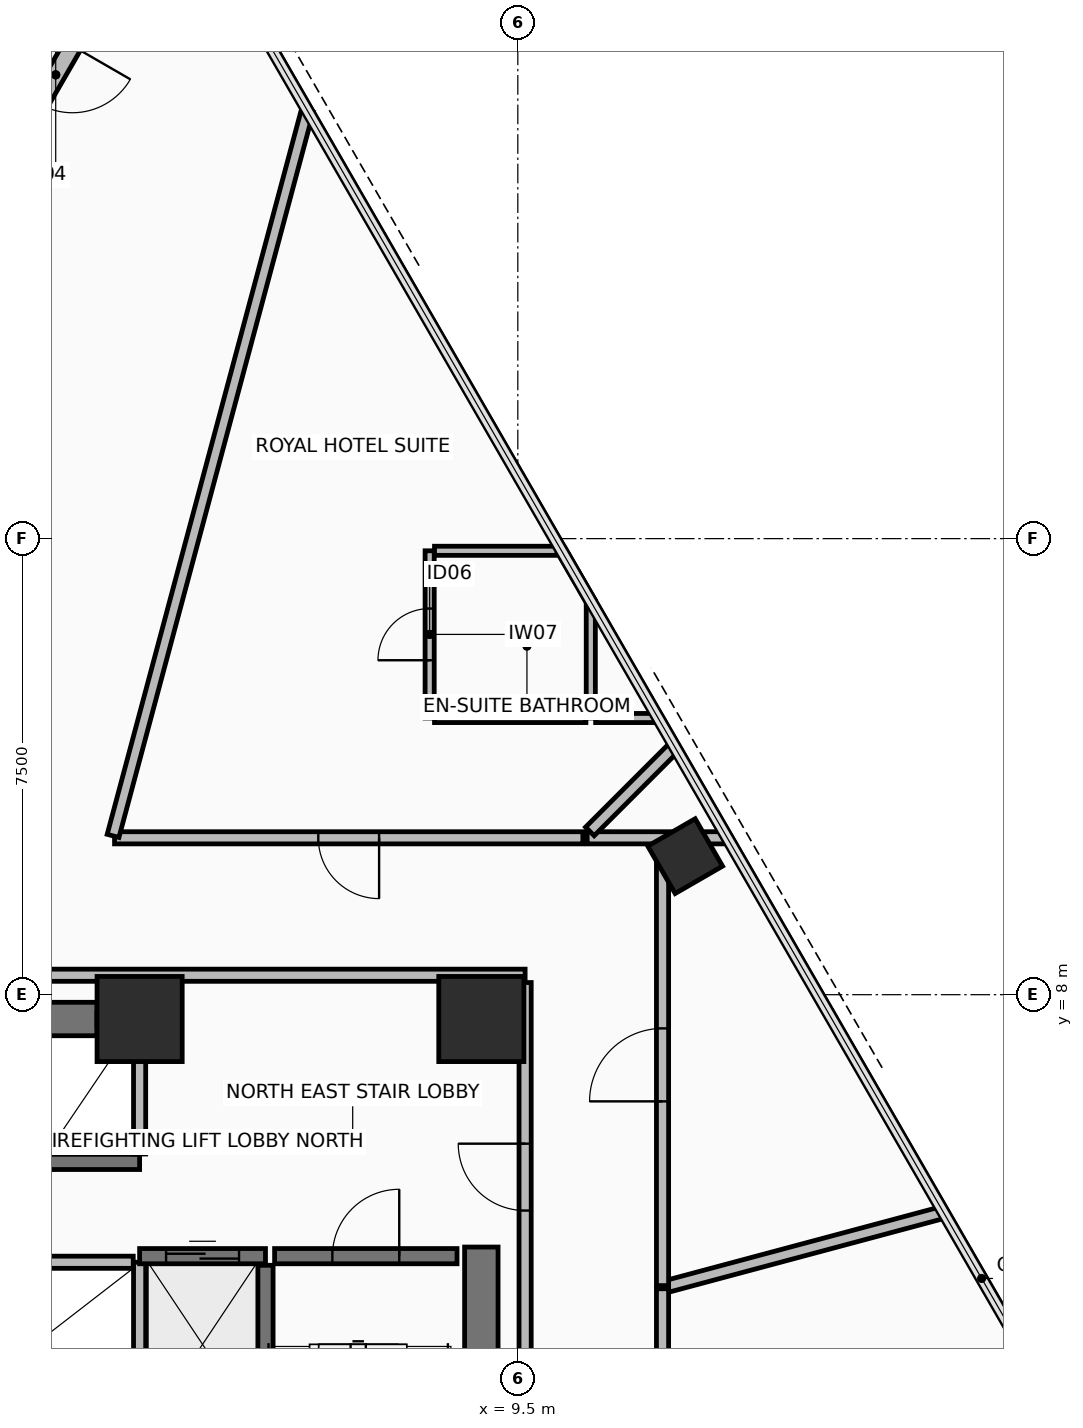
"""IFC4 building model, lengths in metres.
Left out: names, types, materials, properties, quantities, classifications, styles, units other than length and angle.
Written with IfcOpenShell. Run it as: python <this file> out.ifc"""

import sys

from ifc_helpers import new_model, si_unit, direction, frame, frame_2d, origin, origin_2d, place, context, subcontext, project, spatial, rectangle, hollow_rectangle, extrude, element, fill, save


model = new_model("IFC4")
c1 = context("Model", 3, precision=1e-05, world=origin(), true_north=direction((0.0, 1.0)))
c2 = subcontext(c1, "Body", "Model", "MODEL_VIEW")
j1 = project(units=[si_unit("LENGTHUNIT", "METRE"), si_unit("PLANEANGLEUNIT", "RADIAN")], contexts=[c1])
p1 = place(None, origin())
s1 = spatial("IfcSite", under=j1, at=p1, CompositionType="ELEMENT")
p2 = place(p1, origin())
s2 = spatial("IfcBuilding", under=s1, at=p2, CompositionType="ELEMENT")
p3 = place(p2, frame((0.0, 0.0, 52.25)))
s3 = spatial("IfcBuildingStorey", under=s2, at=p3, CompositionType="ELEMENT", Elevation=52.25)
for number, where, z_axis, x_axis in (
    (1, (8.9, 7.6, 0.0), (0.0, 0.0, 1.0), (1.0, 0.0, 0.0)),
    (2, (3.28, 7.6, 0.0), (0.0, 0.0, 1.0), (1.0, 0.0, 0.0)),
):
    element("IfcColumn", number, at=place(p3, frame(where, z_axis=z_axis, x_axis=x_axis)), inside=s3, PredefinedType="COLUMN", context=c2, shape_type="SweptSolid", body=[
        extrude(rectangle(XDim=1.4, YDim=1.4, at=origin_2d()), origin(), (0.0, 0.0, 1.0), 4.75),
    ])
p4 = place(p3, frame((12.252, 10.279, 0.0), z_axis=(0.0, 0.0, 1.0), x_axis=(-0.500001511499, 0.866024531118, 0.0)))
e3 = element("IfcColumn", 3, at=p4, inside=s3, PredefinedType="COLUMN", context=c2, shape_type="SweptSolid", body=[
    extrude(hollow_rectangle(XDim=0.9, YDim=0.9, WallThickness=0.05, at=origin_2d()), origin(), (0.0, 0.0, 1.0), 4.75),
])
p5 = place(p3, frame((3.8, 26.418, 0.0), z_axis=(0.0, 0.0, 1.0), x_axis=(-0.500005158081, -0.866022425744, 0.0)))
e4 = element("IfcWall", 4, at=p5, inside=s3, PredefinedType="STANDARD", context=c2, shape_type="SweptSolid", body=[
    extrude(rectangle(XDim=7.6, YDim=0.3, at=frame_2d((3.8, 0.0))), origin(), (0.0, 0.0, 1.0), 2.255),
])
p6 = place(p5, frame((3.25, 0.0, 0.0)))
e5 = element("IfcOpeningElement", 5, at=p6, cuts=e4, PredefinedType="OPENING", context=c2, shape_type="SweptSolid", body=[
    extrude(rectangle(XDim=1.1, YDim=2.2, at=frame_2d((0.55, 1.1))), frame((0.0, 0.16, 0.0), z_axis=(0.0, -1.0, 0.0), x_axis=(1.0, 0.0, 0.0)), (0.0, 0.0, 1.0), 0.32),
])
p7 = place(p3, frame((-2.8, 7.6, 0.0), z_axis=(0.0, 0.0, 1.0), x_axis=(1.0, 0.0, 0.0)))
e6 = element("IfcWall", 6, at=p7, inside=s3, PredefinedType="SHEAR", context=c2, shape_type="SweptSolid", body=[
    extrude(rectangle(XDim=5.38, YDim=0.55, at=frame_2d((2.69, 0.0))), origin(), (0.0, 0.0, 1.0), 4.56),
])
p8 = place(p3, frame((8.9, -6.85, 0.0), z_axis=(0.0, 0.0, 1.0), x_axis=(0.0, 1.0, 0.0)))
e7 = element("IfcWall", 7, at=p8, inside=s3, PredefinedType="SHEAR", context=c2, shape_type="SweptSolid", body=[
    extrude(rectangle(XDim=10.7, YDim=0.55, at=frame_2d((5.35, 0.0))), origin(), (0.0, 0.0, 1.0), 4.56),
])
p9 = place(p3, frame((9.62, 8.32, 0.0), z_axis=(0.0, 0.0, 1.0), x_axis=(-1.0, 0.0, 0.0)))
e8 = element("IfcWall", 8, at=p9, inside=s3, PredefinedType="PARTITIONING", context=c2, shape_type="SweptSolid", body=[
    extrude(rectangle(XDim=19.24, YDim=0.2, at=frame_2d((9.62, 0.0))), origin(), (0.0, 0.0, 1.0), 2.355),
])
p10 = place(p9, frame((16.245, 0.0, 0.0)))
e9 = element("IfcOpeningElement", 9, at=p10, cuts=e8, PredefinedType="OPENING", context=c2, shape_type="SweptSolid", body=[
    extrude(rectangle(XDim=0.9, YDim=2.1, at=frame_2d((0.45, 1.05))), frame((0.0, 0.11, 0.0), z_axis=(0.0, -1.0, 0.0), x_axis=(1.0, 0.0, 0.0)), (0.0, 0.0, 1.0), 0.22),
])
p11 = place(p9, frame((14.295, 0.0, 0.0)))
e10 = element("IfcOpeningElement", 10, at=p11, cuts=e8, PredefinedType="OPENING", context=c2, shape_type="SweptSolid", body=[
    extrude(rectangle(XDim=0.9, YDim=2.1, at=frame_2d((0.45, 1.05))), frame((0.0, 0.11, 0.0), z_axis=(0.0, -1.0, 0.0), x_axis=(1.0, 0.0, 0.0)), (0.0, 0.0, 1.0), 0.22),
])
p12 = place(p3, frame((9.62, -8.2, 0.0), z_axis=(0.0, 0.0, 1.0), x_axis=(0.0, 1.0, 0.0)))
e11 = element("IfcWall", 11, at=p12, inside=s3, PredefinedType="PARTITIONING", context=c2, shape_type="SweptSolid", body=[
    extrude(rectangle(XDim=16.4, YDim=0.2, at=frame_2d((8.2, 0.0))), origin(), (0.0, 0.0, 1.0), 2.355),
])
p13 = place(p12, frame((12.65, 0.0, 0.0)))
e12 = element("IfcOpeningElement", 12, at=p13, cuts=e11, PredefinedType="OPENING", context=c2, shape_type="SweptSolid", body=[
    extrude(rectangle(XDim=1.1, YDim=2.15, at=frame_2d((0.55, 1.075))), frame((0.0, 0.11, 0.0), z_axis=(0.0, -1.0, 0.0), x_axis=(1.0, 0.0, 0.0)), (0.0, 0.0, 1.0), 0.22),
])
p14 = place(p3, frame((5.35, -3.75, 0.0), z_axis=(0.0, 0.0, 1.0), x_axis=(0.0, 1.0, 0.0)))
e13 = element("IfcWall", 13, at=p14, inside=s3, PredefinedType="SHEAR", context=c2, shape_type="SweptSolid", body=[
    extrude(rectangle(XDim=7.3, YDim=0.25, at=frame_2d((3.65, 0.0))), origin(), (0.0, 0.0, 1.0), 4.56),
])
p15 = place(p3, frame((5.5, 3.7, 0.0), z_axis=(0.0, 0.0, 1.0), x_axis=(1.0, 0.0, 0.0)))
e14 = element("IfcWall", 14, at=p15, inside=s3, PredefinedType="SHEAR", context=c2, shape_type="SweptSolid", body=[
    extrude(rectangle(XDim=3.0, YDim=0.25, at=frame_2d((1.5, 0.0))), origin(), (0.0, 0.0, 1.0), 4.56),
])
p16 = place(p15, frame((0.95, 0.0, 0.0)))
e15 = element("IfcOpeningElement", 15, at=p16, cuts=e14, PredefinedType="OPENING", context=c2, shape_type="SweptSolid", body=[
    extrude(rectangle(XDim=1.1, YDim=2.15, at=frame_2d((0.55, 1.075))), frame((0.0, 0.135, 0.0), z_axis=(0.0, -1.0, 0.0), x_axis=(1.0, 0.0, 0.0)), (0.0, 0.0, 1.0), 0.27),
])
p17 = place(p3, frame((1.637, 5.25, 0.0), z_axis=(0.0, 0.0, 1.0), x_axis=(1.0, 0.0, 0.0)))
e16 = element("IfcWall", 16, at=p17, inside=s3, PredefinedType="SHEAR", context=c2, shape_type="SweptSolid", body=[
    extrude(rectangle(XDim=1.643, YDim=0.25, at=frame_2d((0.821, 0.0))), origin(), (0.0, 0.0, 1.0), 4.56),
])
p18 = place(p3, frame((2.58, 7.6, 0.0), z_axis=(0.0, 0.0, 1.0), x_axis=(1.0, 0.0, 0.0)))
e17 = element("IfcWall", 17, at=p18, inside=s3, PredefinedType="PARTITIONING", context=c2, shape_type="SweptSolid", body=[
    extrude(rectangle(XDim=0.7, YDim=0.2, at=frame_2d((0.35, 0.0))), origin(), (0.0, 0.0, 1.0), 2.355),
])
p19 = place(p3, frame((3.28, 5.38, 0.0), z_axis=(0.0, 0.0, 1.0), x_axis=(0.0, 1.0, 0.0)))
e18 = element("IfcWall", 18, at=p19, inside=s3, PredefinedType="PARTITIONING", context=c2, shape_type="SweptSolid", body=[
    extrude(rectangle(XDim=2.115, YDim=0.2, at=frame_2d((1.058, 0.0))), origin(), (0.0, 0.0, 1.0), 2.355),
])
p20 = place(p3, frame((3.28, 1.8, 0.0), z_axis=(0.0, 0.0, 1.0), x_axis=(0.0, 1.0, 0.0)))
e19 = element("IfcWall", 19, at=p20, inside=s3, PredefinedType="PARTITIONING", context=c2, shape_type="SweptSolid", body=[
    extrude(rectangle(XDim=1.8, YDim=0.2, at=frame_2d((0.9, 0.0))), origin(), (0.0, 0.0, 1.0), 4.56),
])
p21 = place(p3, frame((1.13, 3.6, 0.0), z_axis=(0.0, 0.0, 1.0), x_axis=(1.0, 0.0, 0.0)))
e20 = element("IfcWall", 20, at=p21, inside=s3, PredefinedType="PARTITIONING", context=c2, shape_type="SweptSolid", body=[
    extrude(rectangle(XDim=2.045, YDim=0.2, at=frame_2d((1.022, 0.0))), origin(), (0.0, 0.0, 1.0), 3.755),
])
p22 = place(p3, frame((3.28, 3.7, 0.0), z_axis=(0.0, 0.0, 1.0), x_axis=(1.0, 0.0, 0.0)))
e21 = element("IfcWall", 21, at=p22, inside=s3, PredefinedType="SHEAR", context=c2, shape_type="SweptSolid", body=[
    extrude(rectangle(XDim=2.07, YDim=0.25, at=frame_2d((1.035, 0.0))), origin(), (0.0, 0.0, 1.0), 4.56),
])
p23 = place(p22, frame((0.435, 0.0, 0.0)))
e22 = element("IfcOpeningElement", 22, at=p23, cuts=e21, PredefinedType="OPENING", context=c2, shape_type="SweptSolid", body=[
    extrude(rectangle(XDim=1.2, YDim=2.2, at=frame_2d((0.6, 1.1))), frame((0.0, 0.135, 0.0), z_axis=(0.0, -1.0, 0.0), x_axis=(1.0, 0.0, 0.0)), (0.0, 0.0, 1.0), 0.27),
])
p24 = place(p3, frame((8.05, 12.55, 0.0), z_axis=(0.0, 0.0, 1.0), x_axis=(0.0, 1.0, 0.0)))
e23 = element("IfcWall", 23, at=p24, inside=s3, PredefinedType="PARTITIONING", context=c2, shape_type="SweptSolid", body=[
    extrude(rectangle(XDim=2.75, YDim=0.15, at=frame_2d((1.375, 0.0))), origin(), (0.0, 0.0, 1.0), 2.755),
])
p25 = place(p24, frame((0.95, 0.0, 0.0)))
e24 = element("IfcOpeningElement", 24, at=p25, cuts=e23, PredefinedType="OPENING", context=c2, shape_type="SweptSolid", body=[
    extrude(rectangle(XDim=0.85, YDim=2.1, at=frame_2d((0.425, 1.05))), frame((0.0, 0.085, 0.0), z_axis=(0.0, -1.0, 0.0), x_axis=(1.0, 0.0, 0.0)), (0.0, 0.0, 1.0), 0.17),
])
p26 = place(p3, frame((8.13, 15.3, 0.0), z_axis=(0.0, 0.0, 1.0), x_axis=(1.0, 0.0, 0.0)))
e25 = element("IfcWall", 25, at=p26, inside=s3, PredefinedType="PARTITIONING", context=c2, shape_type="SweptSolid", body=[
    extrude(rectangle(XDim=2.089, YDim=0.15, at=frame_2d((1.044, 0.0))), origin(), (0.0, 0.0, 1.0), 2.255),
])
p27 = place(p3, frame((10.219, 15.3, 0.0), z_axis=(0.0, 0.0, 1.0), x_axis=(0.500015396624, -0.866016514357, 0.0)))
e26 = element("IfcWall", 26, at=p27, inside=s3, PredefinedType="PARTITIONING", context=c2, shape_type="SweptSolid", body=[
    extrude(rectangle(XDim=0.962, YDim=0.15, at=frame_2d((0.481, 0.0))), origin(), (0.0, 0.0, 1.0), 4.56),
])
p28 = place(p3, frame((10.7, 14.467, 0.0), z_axis=(0.0, 0.0, 1.0), x_axis=(0.0, -1.0, 0.0)))
e27 = element("IfcWall", 27, at=p28, inside=s3, PredefinedType="PARTITIONING", context=c2, shape_type="SweptSolid", body=[
    extrude(rectangle(XDim=1.917, YDim=0.15, at=frame_2d((0.958, 0.0))), origin(), (0.0, 0.0, 1.0), 2.255),
])
p29 = place(p3, frame((11.807, 12.55, 0.0), z_axis=(0.0, 0.0, 1.0), x_axis=(-1.0, 0.0, 0.0)))
e28 = element("IfcWall", 28, at=p29, inside=s3, PredefinedType="PARTITIONING", context=c2, shape_type="SweptSolid", body=[
    extrude(rectangle(XDim=1.027, YDim=0.15, at=frame_2d((0.513, 0.0))), origin(), (0.0, 0.0, 1.0), 2.255),
])
p30 = place(p3, frame((10.62, 12.55, 0.0), z_axis=(0.0, 0.0, 1.0), x_axis=(-1.0, 0.0, 0.0)))
e29 = element("IfcWall", 29, at=p30, inside=s3, PredefinedType="PARTITIONING", context=c2, shape_type="SweptSolid", body=[
    extrude(rectangle(XDim=2.49, YDim=0.15, at=frame_2d((1.245, 0.0))), origin(), (0.0, 0.0, 1.0), 2.255),
])
p31 = place(p3, frame((12.944, 10.58, 0.0), z_axis=(0.0, 0.0, 1.0), x_axis=(-1.0, 0.0, 0.0)))
e30 = element("IfcWall", 30, at=p31, inside=s3, PredefinedType="PARTITIONING", context=c2, shape_type="SweptSolid", body=[
    extrude(rectangle(XDim=2.304, YDim=0.2, at=frame_2d((1.152, 0.0))), origin(), (0.0, 0.0, 1.0), 2.255),
])
p32 = place(p3, frame((10.685, 10.685, 0.0), z_axis=(0.0, 0.0, 1.0), x_axis=(0.707106781187, 0.707106781187, 0.0)))
e31 = element("IfcWall", 31, at=p32, inside=s3, PredefinedType="PARTITIONING", context=c2, shape_type="SweptSolid", body=[
    extrude(rectangle(XDim=1.971, YDim=0.2, at=frame_2d((0.986, 0.0))), origin(), (0.0, 0.0, 1.0), 2.255),
])
p33 = place(p3, frame((16.5, 4.421, 0.0), z_axis=(0.0, 0.0, 1.0), x_axis=(-0.965923733473, -0.258826855473, 0.0)))
e32 = element("IfcWall", 32, at=p33, inside=s3, PredefinedType="PARTITIONING", context=c2, shape_type="SweptSolid", body=[
    extrude(rectangle(XDim=4.75, YDim=0.2, at=frame_2d((2.375, 0.0))), origin(), (0.0, 0.0, 1.0), 2.255),
])
p34 = place(p3, frame((11.88, 3.216, 0.0), z_axis=(0.0, 0.0, 1.0), x_axis=(0.0, 1.0, 0.0)))
e33 = element("IfcWall", 33, at=p34, inside=s3, PredefinedType="PARTITIONING", context=c2, shape_type="SweptSolid", body=[
    extrude(rectangle(XDim=7.259, YDim=0.2, at=frame_2d((3.63, 0.0))), origin(), (0.0, 0.0, 1.0), 2.255),
])
p35 = place(p34, frame((3.03, 0.0, 0.0)))
e34 = element("IfcOpeningElement", 34, at=p35, cuts=e33, PredefinedType="OPENING", context=c2, shape_type="SweptSolid", body=[
    extrude(rectangle(XDim=1.2, YDim=2.15, at=frame_2d((0.6, 1.075))), frame((0.0, 0.11, 0.0), z_axis=(0.0, -1.0, 0.0), x_axis=(1.0, 0.0, 0.0)), (0.0, 0.0, 1.0), 0.22),
])
p36 = place(p3, frame((10.57, 10.58, 0.0), z_axis=(0.0, 0.0, 1.0), x_axis=(-1.0, 0.0, 0.0)))
e35 = element("IfcWall", 35, at=p36, inside=s3, PredefinedType="PARTITIONING", context=c2, shape_type="SweptSolid", body=[
    extrude(rectangle(XDim=7.702, YDim=0.2, at=frame_2d((3.851, 0.0))), origin(), (0.0, 0.0, 1.0), 2.355),
])
p37 = place(p36, frame((3.351, 0.0, 0.0)))
e36 = element("IfcOpeningElement", 36, at=p37, cuts=e35, PredefinedType="OPENING", context=c2, shape_type="SweptSolid", body=[
    extrude(rectangle(XDim=1.0, YDim=2.15, at=frame_2d((0.5, 1.075))), frame((0.0, 0.11, 0.0), z_axis=(0.0, -1.0, 0.0), x_axis=(1.0, 0.0, 0.0)), (0.0, 0.0, 1.0), 0.22),
])
p38 = place(p3, frame((2.843, 10.612, 0.0), z_axis=(0.0, 0.0, 1.0), x_axis=(0.258820414837, 0.965925459269, 0.0)))
e37 = element("IfcWall", 37, at=p38, inside=s3, PredefinedType="PARTITIONING", context=c2, shape_type="SweptSolid", body=[
    extrude(rectangle(XDim=12.348, YDim=0.2, at=frame_2d((6.174, 0.0))), origin(), (0.0, 0.0, 1.0), 2.255),
])
p39 = place(p3, frame((11.88, -3.164, 0.0), z_axis=(0.0, 0.0, 1.0), x_axis=(0.0, 1.0, 0.0)))
e38 = element("IfcWall", 38, at=p39, inside=s3, PredefinedType="PARTITIONING", context=c2, shape_type="SweptSolid", body=[
    extrude(rectangle(XDim=6.328, YDim=0.2, at=frame_2d((3.164, 0.0))), origin(), (0.0, 0.0, 1.0), 4.56),
])
p40 = place(p39, frame((2.564, 0.0, 0.0)))
e39 = element("IfcOpeningElement", 39, at=p40, cuts=e38, PredefinedType="OPENING", context=c2, shape_type="SweptSolid", body=[
    extrude(rectangle(XDim=1.2, YDim=2.15, at=frame_2d((0.6, 1.075))), frame((0.0, 0.11, 0.0), z_axis=(0.0, -1.0, 0.0), x_axis=(1.0, 0.0, 0.0)), (0.0, 0.0, 1.0), 0.22),
])
p41 = place(p6, origin())
e40 = element("IfcDoor", 40, at=p41, inside=s3, OperationType="SINGLE_SWING_LEFT", PredefinedType="DOOR", context=c2, shape_type="SweptSolid", body=[
    extrude(rectangle(XDim=1.1, YDim=2.2, at=frame_2d((0.55, 1.1))), frame((0.0, 0.025, 0.0), z_axis=(0.0, -1.0, 0.0), x_axis=(1.0, 0.0, 0.0)), (0.0, 0.0, 1.0), 0.05),
])
fill(e5, e40)
p42 = place(p13, frame((1.1, 0.0, 0.0), z_axis=(0.0, 0.0, 1.0), x_axis=(-1.0, 0.0, 0.0)))
e41 = element("IfcDoor", 41, at=p42, inside=s3, OperationType="SINGLE_SWING_LEFT", PredefinedType="DOOR", context=c2, shape_type="SweptSolid", body=[
    extrude(rectangle(XDim=1.1, YDim=2.15, at=frame_2d((0.55, 1.075))), frame((0.0, 0.025, 0.0), z_axis=(0.0, -1.0, 0.0), x_axis=(1.0, 0.0, 0.0)), (0.0, 0.0, 1.0), 0.05),
])
fill(e12, e41)
p43 = place(p16, frame((1.1, 0.0, 0.0), z_axis=(0.0, 0.0, 1.0), x_axis=(-1.0, 0.0, 0.0)))
e42 = element("IfcDoor", 42, at=p43, inside=s3, OperationType="SINGLE_SWING_LEFT", PredefinedType="DOOR", context=c2, shape_type="SweptSolid", body=[
    extrude(rectangle(XDim=1.1, YDim=2.15, at=frame_2d((0.55, 1.075))), frame((0.0, 0.025, 0.0), z_axis=(0.0, -1.0, 0.0), x_axis=(1.0, 0.0, 0.0)), (0.0, 0.0, 1.0), 0.05),
])
fill(e15, e42)
p44 = place(p23, origin())
e43 = element("IfcDoor", 43, at=p44, inside=s3, OperationType="SLIDING_TO_RIGHT", PredefinedType="DOOR", context=c2, shape_type="SweptSolid", body=[
    extrude(rectangle(XDim=1.2, YDim=2.2, at=frame_2d((0.6, 1.1))), frame((0.0, 0.025, 0.0), z_axis=(0.0, -1.0, 0.0), x_axis=(1.0, 0.0, 0.0)), (0.0, 0.0, 1.0), 0.05),
])
fill(e22, e43)
p45 = place(p25, origin())
e44 = element("IfcDoor", 44, at=p45, inside=s3, OperationType="SINGLE_SWING_RIGHT", PredefinedType="DOOR", context=c2, shape_type="SweptSolid", body=[
    extrude(rectangle(XDim=0.85, YDim=2.1, at=frame_2d((0.425, 1.05))), frame((0.0, 0.025, 0.0), z_axis=(0.0, -1.0, 0.0), x_axis=(1.0, 0.0, 0.0)), (0.0, 0.0, 1.0), 0.05),
])
fill(e24, e44)
p46 = place(p35, origin())
e45 = element("IfcDoor", 45, at=p46, inside=s3, OperationType="SINGLE_SWING_LEFT", PredefinedType="DOOR", context=c2, shape_type="SweptSolid", body=[
    extrude(rectangle(XDim=1.2, YDim=2.15, at=frame_2d((0.6, 1.075))), frame((0.0, 0.025, 0.0), z_axis=(0.0, -1.0, 0.0), x_axis=(1.0, 0.0, 0.0)), (0.0, 0.0, 1.0), 0.05),
])
fill(e34, e45)
p47 = place(p37, origin())
e46 = element("IfcDoor", 46, at=p47, inside=s3, OperationType="SINGLE_SWING_LEFT", PredefinedType="DOOR", context=c2, shape_type="SweptSolid", body=[
    extrude(rectangle(XDim=1.0, YDim=2.15, at=frame_2d((0.5, 1.075))), frame((0.0, 0.025, 0.0), z_axis=(0.0, -1.0, 0.0), x_axis=(1.0, 0.0, 0.0)), (0.0, 0.0, 1.0), 0.05),
])
fill(e36, e46)
save(model, sys.argv[1])
